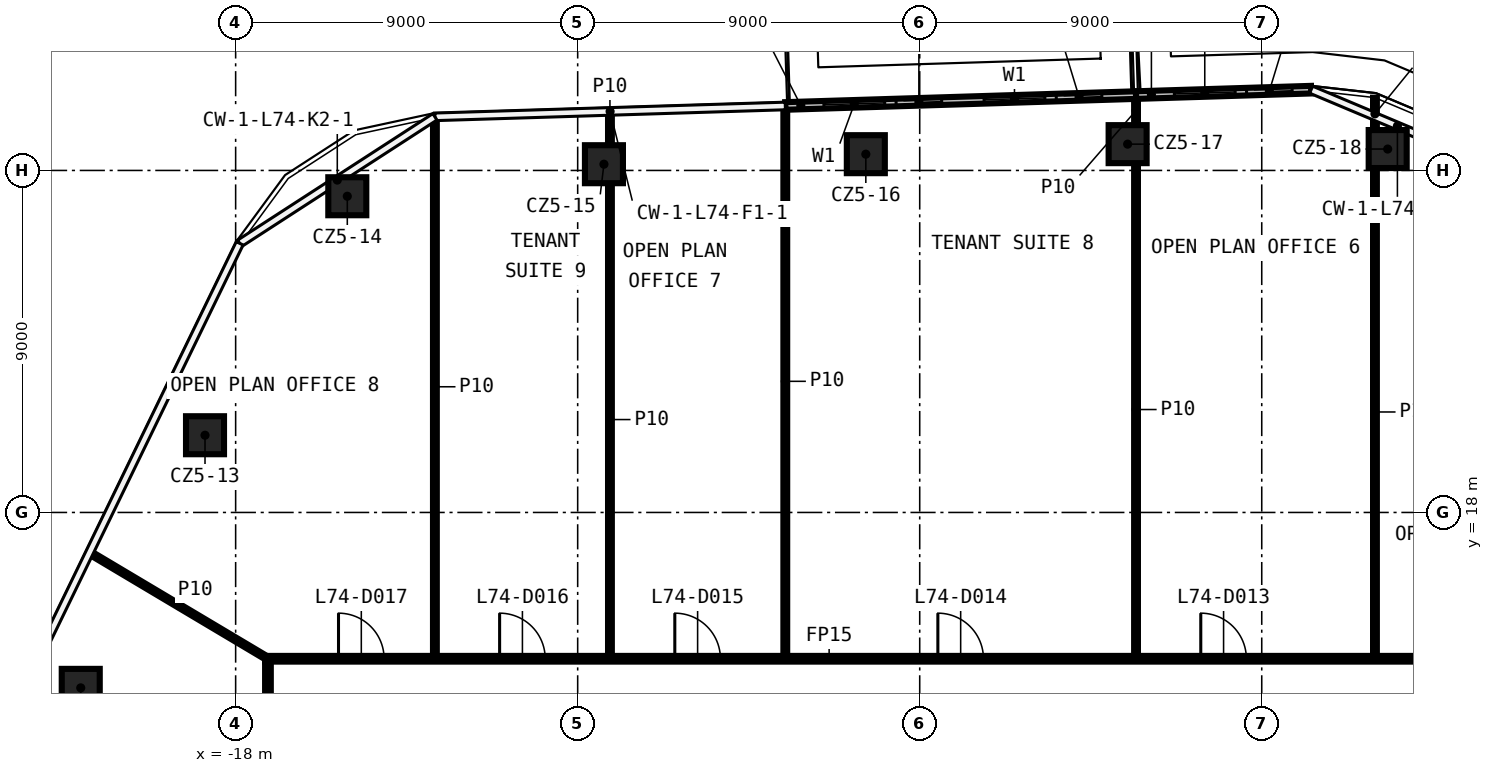
"""IFC4 building model, lengths in metres.
Left out: names, types, materials, properties, quantities, classifications, styles, units other than length and angle.
Written with IfcOpenShell. Run it as: python <this file> out.ifc"""

import sys

from ifc_helpers import new_model, si_unit, direction, frame, frame_2d, origin, origin_2d, place, context, subcontext, project, spatial, rectangle, extrude, element, fill, save


model = new_model("IFC4")
c1 = context("Model", 3, precision=1e-05, world=origin(), true_north=direction((0.0, 1.0)))
c2 = subcontext(c1, "Body", "Model", "MODEL_VIEW")
j1 = project(units=[si_unit("LENGTHUNIT", "METRE"), si_unit("PLANEANGLEUNIT", "RADIAN")], contexts=[c1])
p1 = place(None, origin())
s1 = spatial("IfcSite", under=j1, at=p1, CompositionType="ELEMENT")
p2 = place(p1, origin())
s2 = spatial("IfcBuilding", under=s1, at=p2, CompositionType="ELEMENT")
p3 = place(p2, frame((0.0, 0.0, 344.6)))
s3 = spatial("IfcBuildingStorey", under=s2, at=p3, CompositionType="ELEMENT", Elevation=344.6)
for number, where, z_axis, x_axis in (
    (1, (-22.076, 13.384, 0.0), (0.0, 0.0, 1.0), (1.0, 0.0, 0.0)),
    (2, (-18.806, 20.032, 0.0), (0.0, 0.0, 1.0), (1.0, 0.0, 0.0)),
    (3, (-15.062, 26.321, 0.0), (0.0, 0.0, 1.0), (1.0, 0.0, 0.0)),
    (4, (-8.309, 27.164, 0.0), (0.0, 0.0, 1.0), (1.0, 0.0, 0.0)),
    (5, (-1.418, 27.428, 0.0), (0.0, 0.0, 1.0), (1.0, 0.0, 0.0)),
    (6, (5.471, 27.692, 0.0), (0.0, 0.0, 1.0), (1.0, 0.0, 0.0)),
    (7, (12.314, 27.563, 0.0), (0.0, 0.0, 1.0), (1.0, 0.0, 0.0)),
):
    element("IfcColumn", number, at=place(p3, frame(where, z_axis=z_axis, x_axis=x_axis)), inside=s3, PredefinedType="COLUMN", context=c2, shape_type="SweptSolid", body=[
        extrude(rectangle(XDim=1.0, YDim=1.0, at=origin_2d()), origin(), (0.0, 0.0, 1.0), 3.82),
    ])
p4 = place(p3, frame((-17.225, 14.15, 0.0), z_axis=(0.0, 0.0, 1.0), x_axis=(1.0, 0.0, 0.0)))
e8 = element("IfcWall", 8, at=p4, inside=s3, PredefinedType="PARTITIONING", context=c2, shape_type="SweptSolid", body=[
    extrude(rectangle(XDim=34.45, YDim=0.15, at=frame_2d((17.225, 0.0))), origin(), (0.0, 0.0, 1.0), 3.82),
])
p5 = place(p4, frame((31.19, 0.0, 0.0)))
e9 = element("IfcOpeningElement", 9, at=p5, cuts=e8, PredefinedType="OPENING", context=c2, shape_type="SweptSolid", body=[
    extrude(rectangle(XDim=1.2, YDim=2.1, at=frame_2d((0.6, 1.05))), frame((0.0, 0.085, 0.0), z_axis=(0.0, -1.0, 0.0), x_axis=(1.0, 0.0, 0.0)), (0.0, 0.0, 1.0), 0.17),
])
p6 = place(p4, frame((24.621, 0.0, 0.0)))
e10 = element("IfcOpeningElement", 10, at=p6, cuts=e8, PredefinedType="OPENING", context=c2, shape_type="SweptSolid", body=[
    extrude(rectangle(XDim=1.2, YDim=2.1, at=frame_2d((0.6, 1.05))), frame((0.0, 0.085, 0.0), z_axis=(0.0, -1.0, 0.0), x_axis=(1.0, 0.0, 0.0)), (0.0, 0.0, 1.0), 0.17),
])
p7 = place(p4, frame((17.703, 0.0, 0.0)))
e11 = element("IfcOpeningElement", 11, at=p7, cuts=e8, PredefinedType="OPENING", context=c2, shape_type="SweptSolid", body=[
    extrude(rectangle(XDim=1.2, YDim=2.1, at=frame_2d((0.6, 1.05))), frame((0.0, 0.085, 0.0), z_axis=(0.0, -1.0, 0.0), x_axis=(1.0, 0.0, 0.0)), (0.0, 0.0, 1.0), 0.17),
])
p8 = place(p4, frame((10.781, 0.0, 0.0)))
e12 = element("IfcOpeningElement", 12, at=p8, cuts=e8, PredefinedType="OPENING", context=c2, shape_type="SweptSolid", body=[
    extrude(rectangle(XDim=1.2, YDim=2.1, at=frame_2d((0.6, 1.05))), frame((0.0, 0.085, 0.0), z_axis=(0.0, -1.0, 0.0), x_axis=(1.0, 0.0, 0.0)), (0.0, 0.0, 1.0), 0.17),
])
p9 = place(p4, frame((6.171, 0.0, 0.0)))
e13 = element("IfcOpeningElement", 13, at=p9, cuts=e8, PredefinedType="OPENING", context=c2, shape_type="SweptSolid", body=[
    extrude(rectangle(XDim=1.2, YDim=2.1, at=frame_2d((0.6, 1.05))), frame((0.0, 0.085, 0.0), z_axis=(0.0, -1.0, 0.0), x_axis=(1.0, 0.0, 0.0)), (0.0, 0.0, 1.0), 0.17),
])
p10 = place(p4, frame((1.932, 0.0, 0.0)))
e14 = element("IfcOpeningElement", 14, at=p10, cuts=e8, PredefinedType="OPENING", context=c2, shape_type="SweptSolid", body=[
    extrude(rectangle(XDim=1.2, YDim=2.1, at=frame_2d((0.6, 1.05))), frame((0.0, 0.085, 0.0), z_axis=(0.0, -1.0, 0.0), x_axis=(1.0, 0.0, 0.0)), (0.0, 0.0, 1.0), 0.17),
])
p11 = place(p3, frame((11.979, 14.225, 0.0), z_axis=(0.0, 0.0, 1.0), x_axis=(0.0, 1.0, 0.0)))
e15 = element("IfcWall", 15, at=p11, inside=s3, PredefinedType="PARTITIONING", context=c2, shape_type="SweptSolid", body=[
    extrude(rectangle(XDim=12.838, YDim=0.1, at=frame_2d((6.419, 0.0))), origin(), (0.0, 0.0, 1.0), 3.82),
])
p12 = place(p3, frame((11.979, 28.063, 0.0), z_axis=(0.0, 0.0, 1.0), x_axis=(0.0, 1.0, 0.0)))
e16 = element("IfcWall", 16, at=p12, inside=s3, PredefinedType="PARTITIONING", context=c2, shape_type="SweptSolid", body=[
    extrude(rectangle(XDim=0.852, YDim=0.1, at=frame_2d((0.426, 0.0))), origin(), (0.0, 0.0, 1.0), 3.82),
])
p13 = place(p3, frame((5.692, 14.225, 0.0), z_axis=(0.0, 0.0, 1.0), x_axis=(0.0, 1.0, 0.0)))
e17 = element("IfcWall", 17, at=p13, inside=s3, PredefinedType="PARTITIONING", context=c2, shape_type="SweptSolid", body=[
    extrude(rectangle(XDim=12.967, YDim=0.1, at=frame_2d((6.483, 0.0))), origin(), (0.0, 0.0, 1.0), 3.82),
])
p14 = place(p3, frame((5.692, 28.192, 0.0), z_axis=(0.0, 0.0, 1.0), x_axis=(0.0, 1.0, 0.0)))
e18 = element("IfcWall", 18, at=p14, inside=s3, PredefinedType="PARTITIONING", context=c2, shape_type="SweptSolid", body=[
    extrude(rectangle(XDim=0.771, YDim=0.1, at=frame_2d((0.385, 0.0))), origin(), (0.0, 0.0, 1.0), 3.82),
])
p15 = place(p3, frame((-3.537, 14.225, 0.0), z_axis=(0.0, 0.0, 1.0), x_axis=(0.0, 1.0, 0.0)))
e19 = element("IfcWall", 19, at=p15, inside=s3, PredefinedType="PARTITIONING", context=c2, shape_type="SweptSolid", body=[
    extrude(rectangle(XDim=14.451, YDim=0.1, at=frame_2d((7.226, 0.0))), origin(), (0.0, 0.0, 1.0), 3.82),
])
p16 = place(p3, frame((-8.151, 14.225, 0.0), z_axis=(0.0, 0.0, 1.0), x_axis=(0.0, 1.0, 0.0)))
e20 = element("IfcWall", 20, at=p16, inside=s3, PredefinedType="PARTITIONING", context=c2, shape_type="SweptSolid", body=[
    extrude(rectangle(XDim=12.439, YDim=0.1, at=frame_2d((6.219, 0.0))), origin(), (0.0, 0.0, 1.0), 3.82),
])
p17 = place(p3, frame((-8.151, 27.664, 0.0), z_axis=(0.0, 0.0, 1.0), x_axis=(0.0, 1.0, 0.0)))
e21 = element("IfcWall", 21, at=p17, inside=s3, PredefinedType="PARTITIONING", context=c2, shape_type="SweptSolid", body=[
    extrude(rectangle(XDim=0.869, YDim=0.1, at=frame_2d((0.435, 0.0))), origin(), (0.0, 0.0, 1.0), 3.82),
])
p18 = place(p3, frame((-12.757, 14.225, 0.0), z_axis=(0.0, 0.0, 1.0), x_axis=(0.0, 1.0, 0.0)))
e22 = element("IfcWall", 22, at=p18, inside=s3, PredefinedType="PARTITIONING", context=c2, shape_type="SweptSolid", body=[
    extrude(rectangle(XDim=14.165, YDim=0.1, at=frame_2d((7.083, 0.0))), origin(), (0.0, 0.0, 1.0), 3.82),
])
p19 = place(p3, frame((-17.15, -14.075, 0.0), z_axis=(0.0, 0.0, 1.0), x_axis=(0.0, 1.0, 0.0)))
e23 = element("IfcWall", 23, at=p19, inside=s3, PredefinedType="PARTITIONING", context=c2, shape_type="SweptSolid", body=[
    extrude(rectangle(XDim=28.15, YDim=0.15, at=frame_2d((14.075, 0.0))), origin(), (0.0, 0.0, 1.0), 3.82),
])
p20 = place(p19, frame((3.891, 0.0, 0.0)))
e24 = element("IfcOpeningElement", 24, at=p20, cuts=e23, PredefinedType="OPENING", context=c2, shape_type="SweptSolid", body=[
    extrude(rectangle(XDim=1.2, YDim=2.1, at=frame_2d((0.6, 1.05))), frame((0.0, 0.085, 0.0), z_axis=(0.0, -1.0, 0.0), x_axis=(1.0, 0.0, 0.0)), (0.0, 0.0, 1.0), 0.17),
])
p21 = place(p19, frame((24.312, 0.0, 0.0)))
e25 = element("IfcOpeningElement", 25, at=p21, cuts=e23, PredefinedType="OPENING", context=c2, shape_type="SweptSolid", body=[
    extrude(rectangle(XDim=1.2, YDim=2.1, at=frame_2d((0.6, 1.05))), frame((0.0, 0.085, 0.0), z_axis=(0.0, -1.0, 0.0), x_axis=(1.0, 0.0, 0.0)), (0.0, 0.0, 1.0), 0.17),
])
p22 = place(p3, frame((-21.828, 16.935, 0.0), z_axis=(0.0, 0.0, 1.0), x_axis=(0.859229054867, -0.51159107818, 0.0)))
e26 = element("IfcWall", 26, at=p22, inside=s3, PredefinedType="PARTITIONING", context=c2, shape_type="SweptSolid", body=[
    extrude(rectangle(XDim=5.444, YDim=0.1, at=frame_2d((2.722, 0.0))), origin(), (0.0, 0.0, 1.0), 3.82),
])
p23 = place(p3, frame((5.692, 28.983, 0.0), z_axis=(0.0, 0.0, 1.0), x_axis=(-0.999518913705, -0.031015176069, 0.0)))
e27 = element("IfcWall", 27, at=p23, inside=s3, PredefinedType="SOLIDWALL", context=c2, shape_type="SweptSolid", body=[
    extrude(rectangle(XDim=9.233, YDim=0.2, at=frame_2d((4.617, 0.0))), origin(), (0.0, 0.0, 1.0), 3.7),
])
p24 = place(p23, frame((2.4, 0.0, 0.6)))
e28 = element("IfcOpeningElement", 28, at=p24, cuts=e27, PredefinedType="OPENING", context=c2, shape_type="SweptSolid", body=[
    extrude(rectangle(XDim=1.6, YDim=2.4, at=frame_2d((0.8, 1.2))), frame((0.0, 0.11, 0.0), z_axis=(0.0, -1.0, 0.0), x_axis=(1.0, 0.0, 0.0)), (0.0, 0.0, 1.0), 0.22),
])
p25 = place(p23, frame((0.9, 0.0, 0.0)))
e29 = element("IfcOpeningElement", 29, at=p25, cuts=e27, PredefinedType="OPENING", context=c2, shape_type="SweptSolid", body=[
    extrude(rectangle(XDim=1.2, YDim=2.4, at=frame_2d((0.6, 1.2))), frame((0.0, 0.11, 0.0), z_axis=(0.0, -1.0, 0.0), x_axis=(1.0, 0.0, 0.0)), (0.0, 0.0, 1.0), 0.22),
])
p26 = place(p23, frame((6.617, 0.0, 0.6)))
e30 = element("IfcOpeningElement", 30, at=p26, cuts=e27, PredefinedType="OPENING", context=c2, shape_type="SweptSolid", body=[
    extrude(rectangle(XDim=1.6, YDim=2.4, at=frame_2d((0.8, 1.2))), frame((0.0, 0.11, 0.0), z_axis=(0.0, -1.0, 0.0), x_axis=(1.0, 0.0, 0.0)), (0.0, 0.0, 1.0), 0.22),
])
p27 = place(p23, frame((5.117, 0.0, 0.0)))
e31 = element("IfcOpeningElement", 31, at=p27, cuts=e27, PredefinedType="OPENING", context=c2, shape_type="SweptSolid", body=[
    extrude(rectangle(XDim=1.2, YDim=2.4, at=frame_2d((0.6, 1.2))), frame((0.0, 0.11, 0.0), z_axis=(0.0, -1.0, 0.0), x_axis=(1.0, 0.0, 0.0)), (0.0, 0.0, 1.0), 0.22),
])
p28 = place(p3, frame((10.299, 29.126, 0.0), z_axis=(0.0, 0.0, 1.0), x_axis=(-0.999519847684, -0.030985062312, 0.0)))
e32 = element("IfcWall", 32, at=p28, inside=s3, PredefinedType="SOLIDWALL", context=c2, shape_type="SweptSolid", body=[
    extrude(rectangle(XDim=4.609, YDim=0.2, at=frame_2d((2.305, 0.0))), origin(), (0.0, 0.0, 1.0), 3.7),
])
p29 = place(p28, frame((2.0, 0.0, 0.6)))
e33 = element("IfcOpeningElement", 33, at=p29, cuts=e32, PredefinedType="OPENING", context=c2, shape_type="SweptSolid", body=[
    extrude(rectangle(XDim=1.6, YDim=2.4, at=frame_2d((0.8, 1.2))), frame((0.0, 0.11, 0.0), z_axis=(0.0, -1.0, 0.0), x_axis=(1.0, 0.0, 0.0)), (0.0, 0.0, 1.0), 0.22),
])
p30 = place(p28, frame((0.5, 0.0, 0.0)))
e34 = element("IfcOpeningElement", 34, at=p30, cuts=e32, PredefinedType="OPENING", context=c2, shape_type="SweptSolid", body=[
    extrude(rectangle(XDim=1.2, YDim=2.4, at=frame_2d((0.6, 1.2))), frame((0.0, 0.11, 0.0), z_axis=(0.0, -1.0, 0.0), x_axis=(1.0, 0.0, 0.0)), (0.0, 0.0, 1.0), 0.22),
])
p31 = place(p6, origin())
e35 = element("IfcDoor", 35, at=p31, inside=s3, OperationType="SINGLE_SWING_RIGHT", PredefinedType="DOOR", context=c2, shape_type="SweptSolid", body=[
    extrude(rectangle(XDim=1.2, YDim=2.1, at=frame_2d((0.6, 1.05))), frame((0.0, 0.025, 0.0), z_axis=(0.0, -1.0, 0.0), x_axis=(1.0, 0.0, 0.0)), (0.0, 0.0, 1.0), 0.05),
])
fill(e10, e35)
p32 = place(p7, origin())
e36 = element("IfcDoor", 36, at=p32, inside=s3, OperationType="SINGLE_SWING_LEFT", PredefinedType="DOOR", context=c2, shape_type="SweptSolid", body=[
    extrude(rectangle(XDim=1.2, YDim=2.1, at=frame_2d((0.6, 1.05))), frame((0.0, 0.025, 0.0), z_axis=(0.0, -1.0, 0.0), x_axis=(1.0, 0.0, 0.0)), (0.0, 0.0, 1.0), 0.05),
])
fill(e11, e36)
p33 = place(p8, origin())
e37 = element("IfcDoor", 37, at=p33, inside=s3, OperationType="SINGLE_SWING_RIGHT", PredefinedType="DOOR", context=c2, shape_type="SweptSolid", body=[
    extrude(rectangle(XDim=1.2, YDim=2.1, at=frame_2d((0.6, 1.05))), frame((0.0, 0.025, 0.0), z_axis=(0.0, -1.0, 0.0), x_axis=(1.0, 0.0, 0.0)), (0.0, 0.0, 1.0), 0.05),
])
fill(e12, e37)
p34 = place(p9, origin())
e38 = element("IfcDoor", 38, at=p34, inside=s3, OperationType="SINGLE_SWING_LEFT", PredefinedType="DOOR", context=c2, shape_type="SweptSolid", body=[
    extrude(rectangle(XDim=1.2, YDim=2.1, at=frame_2d((0.6, 1.05))), frame((0.0, 0.025, 0.0), z_axis=(0.0, -1.0, 0.0), x_axis=(1.0, 0.0, 0.0)), (0.0, 0.0, 1.0), 0.05),
])
fill(e13, e38)
p35 = place(p10, origin())
e39 = element("IfcDoor", 39, at=p35, inside=s3, OperationType="SINGLE_SWING_RIGHT", PredefinedType="DOOR", context=c2, shape_type="SweptSolid", body=[
    extrude(rectangle(XDim=1.2, YDim=2.1, at=frame_2d((0.6, 1.05))), frame((0.0, 0.025, 0.0), z_axis=(0.0, -1.0, 0.0), x_axis=(1.0, 0.0, 0.0)), (0.0, 0.0, 1.0), 0.05),
])
fill(e14, e39)
p36 = place(p24, origin())
e40 = element("IfcWindow", 40, at=p36, inside=s3, PartitioningType="SINGLE_PANEL", PredefinedType="WINDOW", context=c2, shape_type="SweptSolid", body=[
    extrude(rectangle(XDim=1.6, YDim=2.4, at=frame_2d((0.8, 1.2))), frame((0.0, 0.03, 0.0), z_axis=(0.0, -1.0, 0.0), x_axis=(1.0, 0.0, 0.0)), (0.0, 0.0, 1.0), 0.06),
])
fill(e28, e40)
p37 = place(p25, origin())
e41 = element("IfcDoor", 41, at=p37, inside=s3, OperationType="SLIDING_TO_LEFT", PredefinedType="DOOR", context=c2, shape_type="SweptSolid", body=[
    extrude(rectangle(XDim=1.2, YDim=2.4, at=frame_2d((0.6, 1.2))), frame((0.0, 0.025, 0.0), z_axis=(0.0, -1.0, 0.0), x_axis=(1.0, 0.0, 0.0)), (0.0, 0.0, 1.0), 0.05),
])
fill(e29, e41)
p38 = place(p26, origin())
e42 = element("IfcWindow", 42, at=p38, inside=s3, PartitioningType="SINGLE_PANEL", PredefinedType="WINDOW", context=c2, shape_type="SweptSolid", body=[
    extrude(rectangle(XDim=1.6, YDim=2.4, at=frame_2d((0.8, 1.2))), frame((0.0, 0.03, 0.0), z_axis=(0.0, -1.0, 0.0), x_axis=(1.0, 0.0, 0.0)), (0.0, 0.0, 1.0), 0.06),
])
fill(e30, e42)
p39 = place(p27, origin())
e43 = element("IfcDoor", 43, at=p39, inside=s3, OperationType="SLIDING_TO_LEFT", PredefinedType="DOOR", context=c2, shape_type="SweptSolid", body=[
    extrude(rectangle(XDim=1.2, YDim=2.4, at=frame_2d((0.6, 1.2))), frame((0.0, 0.025, 0.0), z_axis=(0.0, -1.0, 0.0), x_axis=(1.0, 0.0, 0.0)), (0.0, 0.0, 1.0), 0.05),
])
fill(e31, e43)
p40 = place(p29, origin())
e44 = element("IfcWindow", 44, at=p40, inside=s3, PartitioningType="SINGLE_PANEL", PredefinedType="WINDOW", context=c2, shape_type="SweptSolid", body=[
    extrude(rectangle(XDim=1.6, YDim=2.4, at=frame_2d((0.8, 1.2))), frame((0.0, 0.03, 0.0), z_axis=(0.0, -1.0, 0.0), x_axis=(1.0, 0.0, 0.0)), (0.0, 0.0, 1.0), 0.06),
])
fill(e33, e44)
p41 = place(p30, origin())
e45 = element("IfcDoor", 45, at=p41, inside=s3, OperationType="SLIDING_TO_LEFT", PredefinedType="DOOR", context=c2, shape_type="SweptSolid", body=[
    extrude(rectangle(XDim=1.2, YDim=2.4, at=frame_2d((0.6, 1.2))), frame((0.0, 0.025, 0.0), z_axis=(0.0, -1.0, 0.0), x_axis=(1.0, 0.0, 0.0)), (0.0, 0.0, 1.0), 0.05),
])
fill(e34, e45)
save(model, sys.argv[1])
